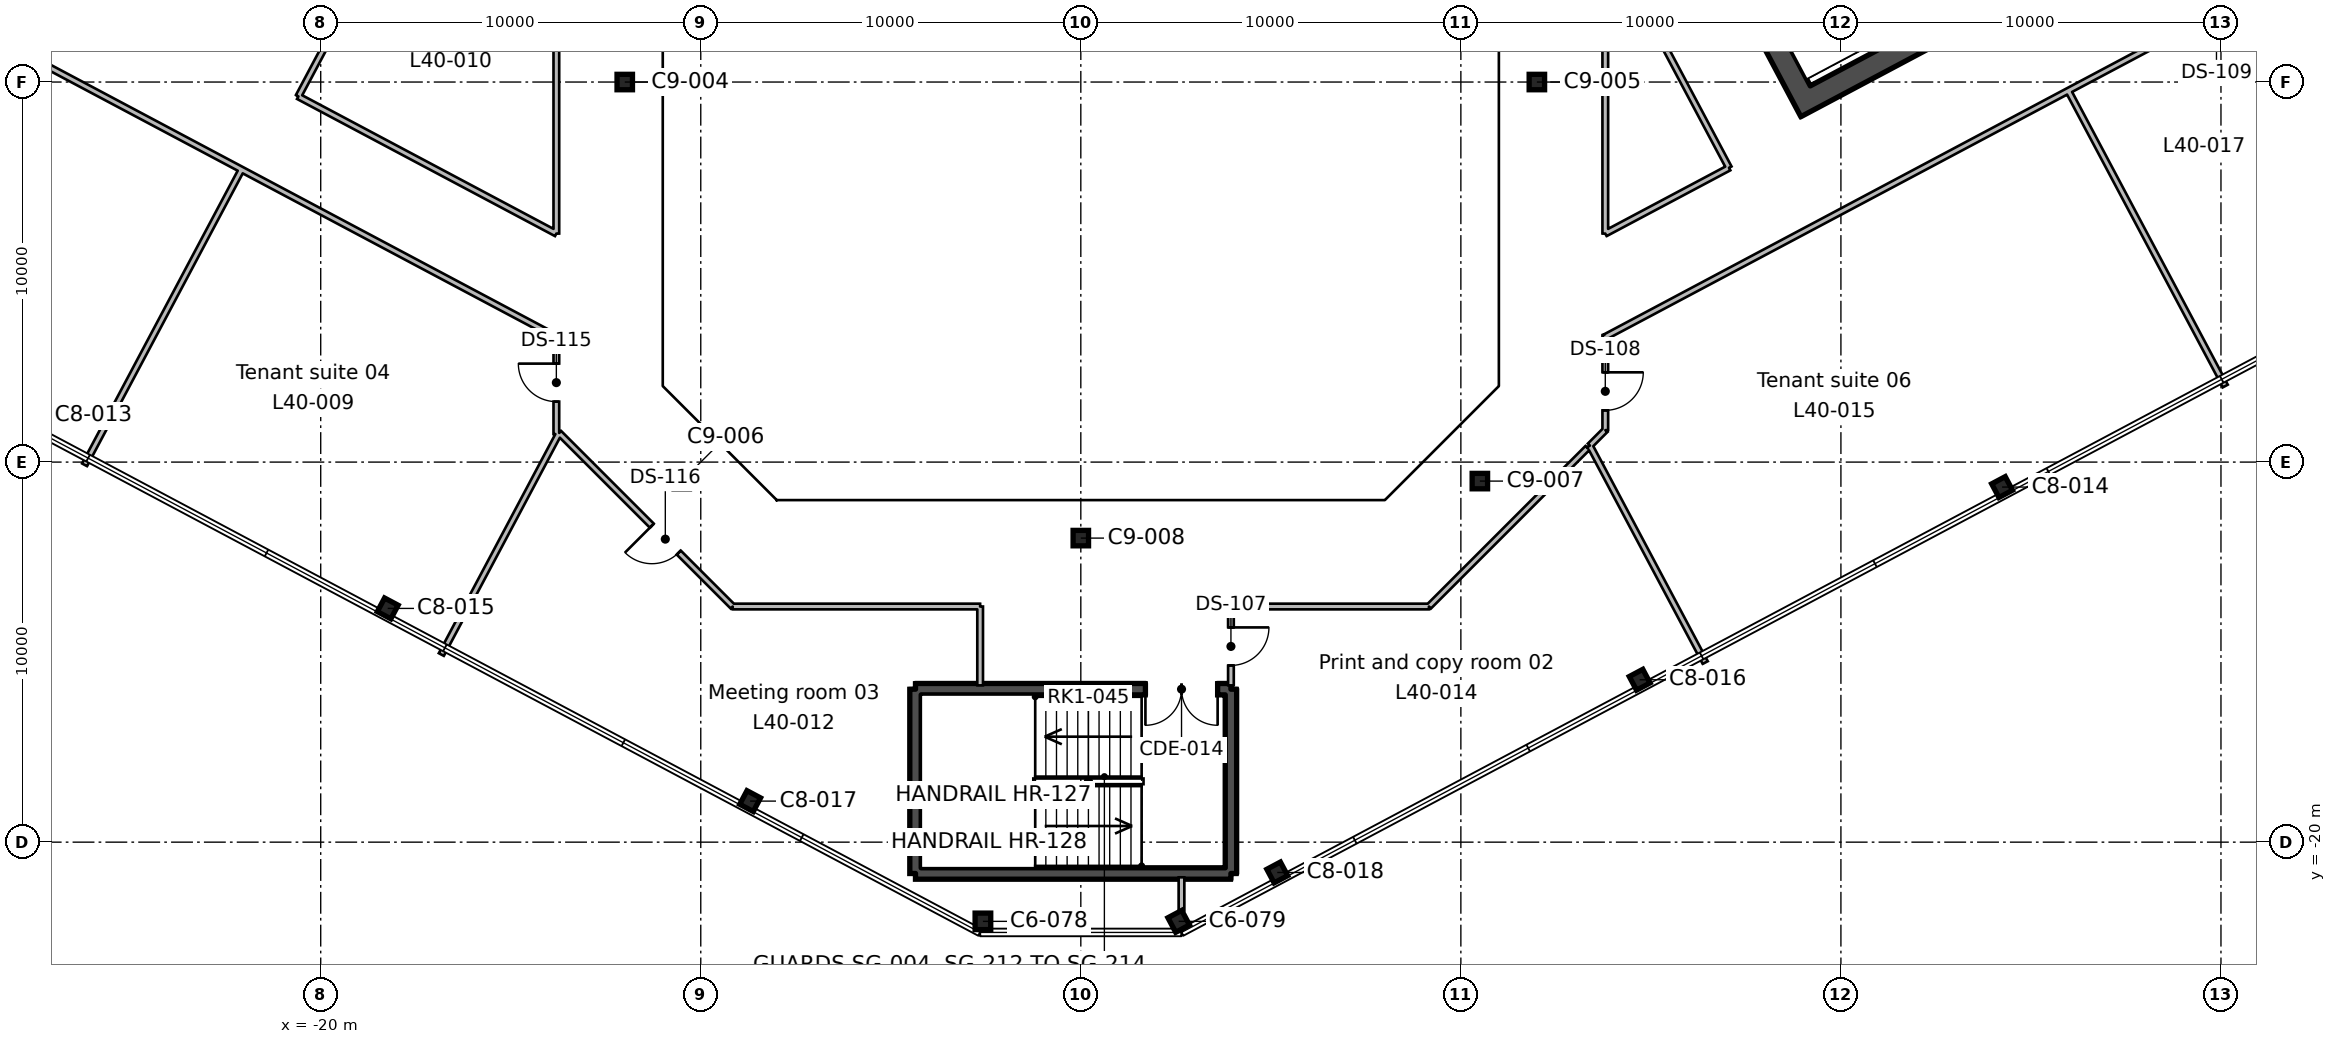
"""IFC4 building model, lengths in metres.
Left out: names, types, materials, properties, quantities, classifications, styles, units other than length and angle.
Written with IfcOpenShell. Run it as: python <this file> out.ifc"""

import sys

from ifc_helpers import new_model, si_unit, direction, frame, frame_2d, origin, origin_2d, place, context, subcontext, project, spatial, rectangle, hollow_rectangle, i_section, extrude, element, fill, save


model = new_model("IFC4")
c1 = context("Model", 3, precision=1e-05, world=origin(), true_north=direction((0.0, 1.0)))
c2 = subcontext(c1, "Body", "Model", "MODEL_VIEW")
j1 = project(units=[si_unit("LENGTHUNIT", "METRE"), si_unit("PLANEANGLEUNIT", "RADIAN")], contexts=[c1])
p1 = place(None, origin())
s1 = spatial("IfcSite", under=j1, at=p1, CompositionType="ELEMENT")
p2 = place(p1, origin())
s2 = spatial("IfcBuilding", under=s1, at=p2, CompositionType="ELEMENT")
p3 = place(p2, frame((0.0, 0.0, 189.6)))
s3 = spatial("IfcBuildingStorey", under=s2, at=p3, CompositionType="ELEMENT", Elevation=189.6)
for number, where, z_axis, x_axis in (
    (1, (-2.576, -22.084, 0.0), (0.0, 0.0, 1.0), (1.0, 0.0, 0.0)),
    (2, (2.576, -22.084, 0.0), (0.0, 0.0, 1.0), (0.883, 0.469, 0.0)),
):
    element("IfcColumn", number, at=place(p3, frame(where, z_axis=z_axis, x_axis=x_axis)), inside=s3, PredefinedType="COLUMN", context=c2, shape_type="SweptSolid", body=[
        extrude(i_section(OverallWidth=0.412, OverallDepth=0.434, WebThickness=0.036, FlangeThickness=0.057, FilletRadius=0.015, at=origin_2d()), origin(), (0.0, 0.0, 1.0), 3.9),
    ])
for number, where, z_axis, x_axis in (
    (3, (5.169, -20.798, 0.0), (0.0, 0.0, 1.0), (0.883, 0.469, 0.0)),
    (4, (-8.701, -18.92, 0.0), (0.0, 0.0, 1.0), (0.883, -0.469, 0.0)),
    (5, (14.705, -15.727, 0.0), (0.0, 0.0, 1.0), (0.883, 0.469, 0.0)),
    (6, (-18.237, -13.85, 0.0), (0.0, 0.0, 1.0), (0.883, -0.469, 0.0)),
):
    element("IfcColumn", number, at=place(p3, frame(where, z_axis=z_axis, x_axis=x_axis)), inside=s3, PredefinedType="COLUMN", context=c2, shape_type="SweptSolid", body=[
        extrude(i_section(OverallWidth=0.404, OverallDepth=0.406, WebThickness=0.027, FlangeThickness=0.044, FilletRadius=0.015, at=origin_2d()), origin(), (0.0, 0.0, 1.0), 3.9),
    ])
p4 = place(p3, frame((0.0, -12.0, 0.0), z_axis=(0.0, 0.0, 1.0), x_axis=(1.0, 0.0, 0.0)))
e7 = element("IfcColumn", 7, at=p4, inside=s3, PredefinedType="COLUMN", context=c2, shape_type="SweptSolid", body=[
    extrude(hollow_rectangle(XDim=0.406, YDim=0.406, WallThickness=0.015, InnerFilletRadius=0.007, OuterFilletRadius=0.022, at=origin_2d()), origin(), (0.0, 0.0, 1.0), 3.9),
])
p5 = place(p3, frame((24.241, -10.657, 0.0), z_axis=(0.0, 0.0, 1.0), x_axis=(0.882947592859, 0.469471562786, 0.0)))
e8 = element("IfcColumn", 8, at=p5, inside=s3, PredefinedType="COLUMN", context=c2, shape_type="SweptSolid", body=[
    extrude(i_section(OverallWidth=0.404, OverallDepth=0.406, WebThickness=0.027, FlangeThickness=0.044, FilletRadius=0.015, at=origin_2d()), origin(), (0.0, 0.0, 1.0), 3.9),
])
for number, where, z_axis, x_axis in (
    (9, (-10.5, -10.5, 0.0), (0.0, 0.0, 1.0), (1.0, 0.0, 0.0)),
    (10, (10.5, -10.5, 0.0), (0.0, 0.0, 1.0), (1.0, 0.0, 0.0)),
    (11, (-12.0, 0.0, 0.0), (0.0, 0.0, 1.0), (1.0, 0.0, 0.0)),
    (12, (12.0, 0.0, 0.0), (0.0, 0.0, 1.0), (1.0, 0.0, 0.0)),
):
    element("IfcColumn", number, at=place(p3, frame(where, z_axis=z_axis, x_axis=x_axis)), inside=s3, PredefinedType="COLUMN", context=c2, shape_type="SweptSolid", body=[
        extrude(hollow_rectangle(XDim=0.406, YDim=0.406, WallThickness=0.015, InnerFilletRadius=0.007, OuterFilletRadius=0.022, at=origin_2d()), origin(), (0.0, 0.0, 1.0), 3.9),
    ])
p6 = place(p3, frame((19.211, -0.771, 0.0), z_axis=(0.0, 0.0, 1.0), x_axis=(-0.469463742137, 0.882951751127, 0.0)))
e13 = element("IfcWall", 13, at=p6, inside=s3, PredefinedType="SHEAR", context=c2, shape_type="SweptSolid", body=[
    extrude(rectangle(XDim=19.4, YDim=0.6, at=frame_2d((9.7, 0.0))), origin(), (0.0, 0.0, 1.0), 3.9),
])
p7 = place(p6, frame((6.7, 0.0, 0.0)))
e14 = element("IfcOpeningElement", 14, at=p7, cuts=e13, PredefinedType="OPENING", context=c2, shape_type="SweptSolid", body=[
    extrude(rectangle(XDim=2.4, YDim=2.4, at=frame_2d((1.2, 1.2))), frame((0.0, 0.31, 0.0), z_axis=(0.0, -1.0, 0.0), x_axis=(1.0, 0.0, 0.0)), (0.0, 0.0, 1.0), 0.62),
])
p8 = place(p3, frame((19.335, -0.366, 0.0), z_axis=(0.0, 0.0, 1.0), x_axis=(0.88294509198, 0.469476266226, 0.0)))
e15 = element("IfcWall", 15, at=p8, inside=s3, PredefinedType="SHEAR", context=c2, shape_type="SweptSolid", body=[
    extrude(rectangle(XDim=20.2, YDim=0.6, at=frame_2d((10.1, 0.0))), origin(), (0.0, 0.0, 1.0), 3.9),
])
p9 = place(p3, frame((3.95, -15.975, 0.0), z_axis=(0.0, 0.0, 1.0), x_axis=(0.0, -1.0, 0.0)))
e16 = element("IfcWall", 16, at=p9, inside=s3, PredefinedType="SHEAR", context=c2, shape_type="SweptSolid", body=[
    extrude(rectangle(XDim=4.85, YDim=0.3, at=frame_2d((2.425, 0.0))), origin(), (0.0, 0.0, 1.0), 3.9),
])
p10 = place(p3, frame((3.95, -20.825, 0.0), z_axis=(0.0, 0.0, 1.0), x_axis=(-1.0, 0.0, 0.0)))
e17 = element("IfcWall", 17, at=p10, inside=s3, PredefinedType="SHEAR", context=c2, shape_type="SweptSolid", body=[
    extrude(rectangle(XDim=8.3, YDim=0.3, at=frame_2d((4.15, 0.0))), origin(), (0.0, 0.0, 1.0), 3.9),
])
p11 = place(p3, frame((-4.35, -20.825, 0.0), z_axis=(0.0, 0.0, 1.0), x_axis=(0.0, 1.0, 0.0)))
e18 = element("IfcWall", 18, at=p11, inside=s3, PredefinedType="SHEAR", context=c2, shape_type="SweptSolid", body=[
    extrude(rectangle(XDim=4.85, YDim=0.3, at=frame_2d((2.425, 0.0))), origin(), (0.0, 0.0, 1.0), 3.9),
])
p12 = place(p3, frame((-4.35, -15.975, 0.0), z_axis=(0.0, 0.0, 1.0), x_axis=(1.0, 0.0, 0.0)))
e19 = element("IfcWall", 19, at=p12, inside=s3, PredefinedType="SHEAR", context=c2, shape_type="SweptSolid", body=[
    extrude(rectangle(XDim=8.3, YDim=0.3, at=frame_2d((4.15, 0.0))), origin(), (0.0, 0.0, 1.0), 3.9),
])
p13 = place(p12, frame((6.05, 0.0, 0.0)))
e20 = element("IfcOpeningElement", 20, at=p13, cuts=e19, PredefinedType="OPENING", context=c2, shape_type="SweptSolid", body=[
    extrude(rectangle(XDim=1.9, YDim=2.1, at=frame_2d((0.95, 1.05))), frame((0.0, 0.16, 0.0), z_axis=(0.0, -1.0, 0.0), x_axis=(1.0, 0.0, 0.0)), (0.0, 0.0, 1.0), 0.32),
])
p14 = place(p3, frame((-22.083, -2.302, 0.0), z_axis=(0.0, 0.0, 1.0), x_axis=(-0.469445946219, -0.882961212952, 0.0)))
e21 = element("IfcWall", 21, at=p14, inside=s3, PredefinedType="PARTITIONING", context=c2, shape_type="SweptSolid", body=[
    extrude(rectangle(XDim=8.8, YDim=0.15, at=frame_2d((4.4, 0.0))), origin(), (0.0, 0.0, 1.0), 3.54),
])
p15 = place(p3, frame((-13.8, -9.263, 0.0), z_axis=(0.0, 0.0, 1.0), x_axis=(0.0, 1.0, 0.0)))
e22 = element("IfcWall", 22, at=p15, inside=s3, PredefinedType="PARTITIONING", context=c2, shape_type="SweptSolid", body=[
    extrude(rectangle(XDim=2.557, YDim=0.15, at=frame_2d((1.278, 0.0))), origin(), (0.0, 0.0, 1.0), 3.54),
])
p16 = place(p15, frame((0.854, 0.0, 0.0)))
e23 = element("IfcOpeningElement", 23, at=p16, cuts=e22, PredefinedType="OPENING", context=c2, shape_type="SweptSolid", body=[
    extrude(rectangle(XDim=1.0, YDim=2.1, at=frame_2d((0.5, 1.05))), frame((0.0, 0.085, 0.0), z_axis=(0.0, -1.0, 0.0), x_axis=(1.0, 0.0, 0.0)), (0.0, 0.0, 1.0), 0.17),
])
p17 = place(p3, frame((-13.8, -6.706, 0.0), z_axis=(0.0, 0.0, 1.0), x_axis=(-0.882947286887, 0.469472138235, 0.0)))
e24 = element("IfcWall", 24, at=p17, inside=s3, PredefinedType="PARTITIONING", context=c2, shape_type="SweptSolid", body=[
    extrude(rectangle(XDim=36.571, YDim=0.15, at=frame_2d((18.285, 0.0))), origin(), (0.0, 0.0, 1.0), 3.54),
])
p18 = place(p17, frame((34.15, 0.0, 0.0)))
e25 = element("IfcOpeningElement", 25, at=p18, cuts=e24, PredefinedType="OPENING", context=c2, shape_type="SweptSolid", body=[
    extrude(rectangle(XDim=1.0, YDim=2.1, at=frame_2d((0.5, 1.05))), frame((0.0, 0.085, 0.0), z_axis=(0.0, -1.0, 0.0), x_axis=(1.0, 0.0, 0.0)), (0.0, 0.0, 1.0), 0.17),
])
p19 = place(p17, frame((17.35, 0.0, 0.0)))
e26 = element("IfcOpeningElement", 26, at=p19, cuts=e24, PredefinedType="OPENING", context=c2, shape_type="SweptSolid", body=[
    extrude(rectangle(XDim=1.8, YDim=2.1, at=frame_2d((0.9, 1.05))), frame((0.0, 0.085, 0.0), z_axis=(0.0, -1.0, 0.0), x_axis=(1.0, 0.0, 0.0)), (0.0, 0.0, 1.0), 0.17),
])
p20 = place(p3, frame((-13.726, -9.234, 0.0), z_axis=(0.0, 0.0, 1.0), x_axis=(-0.469465185833, -0.882950983515, 0.0)))
e27 = element("IfcWall", 27, at=p20, inside=s3, PredefinedType="PARTITIONING", context=c2, shape_type="SweptSolid", body=[
    extrude(rectangle(XDim=6.603, YDim=0.15, at=frame_2d((3.302, 0.0))), origin(), (0.0, 0.0, 1.0), 3.54),
])
p21 = place(p3, frame((-13.726, -9.234, 0.0), z_axis=(0.0, 0.0, 1.0), x_axis=(0.707106781187, -0.707106781187, 0.0)))
e28 = element("IfcWall", 28, at=p21, inside=s3, PredefinedType="PARTITIONING", context=c2, shape_type="SweptSolid", body=[
    extrude(rectangle(XDim=6.458, YDim=0.15, at=frame_2d((3.229, 0.0))), origin(), (0.0, 0.0, 1.0), 3.54),
])
p22 = place(p21, frame((3.45, 0.0, 0.0)))
e29 = element("IfcOpeningElement", 29, at=p22, cuts=e28, PredefinedType="OPENING", context=c2, shape_type="SweptSolid", body=[
    extrude(rectangle(XDim=1.0, YDim=2.1, at=frame_2d((0.5, 1.05))), frame((0.0, 0.085, 0.0), z_axis=(0.0, -1.0, 0.0), x_axis=(1.0, 0.0, 0.0)), (0.0, 0.0, 1.0), 0.17),
])
p23 = place(p3, frame((-2.649, -15.875, 0.0), z_axis=(0.0, 0.0, 1.0), x_axis=(0.0, 1.0, 0.0)))
e30 = element("IfcWall", 30, at=p23, inside=s3, PredefinedType="PARTITIONING", context=c2, shape_type="SweptSolid", body=[
    extrude(rectangle(XDim=2.075, YDim=0.15, at=frame_2d((1.038, 0.0))), origin(), (0.0, 0.0, 1.0), 3.54),
])
p24 = place(p3, frame((-2.649, -13.8, 0.0), z_axis=(0.0, 0.0, 1.0), x_axis=(-1.0, 0.0, 0.0)))
e31 = element("IfcWall", 31, at=p24, inside=s3, PredefinedType="PARTITIONING", context=c2, shape_type="SweptSolid", body=[
    extrude(rectangle(XDim=6.511, YDim=0.15, at=frame_2d((3.255, 0.0))), origin(), (0.0, 0.0, 1.0), 3.54),
])
p25 = place(p3, frame((2.649, -21.799, 0.0), z_axis=(0.0, 0.0, 1.0), x_axis=(0.0, 1.0, 0.0)))
e32 = element("IfcWall", 32, at=p25, inside=s3, PredefinedType="PARTITIONING", context=c2, shape_type="SweptSolid", body=[
    extrude(rectangle(XDim=0.874, YDim=0.15, at=frame_2d((0.437, 0.0))), origin(), (0.0, 0.0, 1.0), 3.54),
])
p26 = place(p3, frame((3.95, -13.8, 0.0), z_axis=(0.0, 0.0, 1.0), x_axis=(0.0, -1.0, 0.0)))
e33 = element("IfcWall", 33, at=p26, inside=s3, PredefinedType="PARTITIONING", context=c2, shape_type="SweptSolid", body=[
    extrude(rectangle(XDim=2.075, YDim=0.15, at=frame_2d((1.038, 0.0))), origin(), (0.0, 0.0, 1.0), 3.54),
])
p27 = place(p26, frame((0.55, 0.0, 0.0)))
e34 = element("IfcOpeningElement", 34, at=p27, cuts=e33, PredefinedType="OPENING", context=c2, shape_type="SweptSolid", body=[
    extrude(rectangle(XDim=1.0, YDim=2.1, at=frame_2d((0.5, 1.05))), frame((0.0, 0.085, 0.0), z_axis=(0.0, -1.0, 0.0), x_axis=(1.0, 0.0, 0.0)), (0.0, 0.0, 1.0), 0.17),
])
p28 = place(p3, frame((13.331, -9.629, 0.0), z_axis=(0.0, 0.0, 1.0), x_axis=(-0.707106781187, -0.707106781187, 0.0)))
e35 = element("IfcWall", 35, at=p28, inside=s3, PredefinedType="PARTITIONING", context=c2, shape_type="SweptSolid", body=[
    extrude(rectangle(XDim=5.899, YDim=0.15, at=frame_2d((2.949, 0.0))), origin(), (0.0, 0.0, 1.0), 3.54),
])
p29 = place(p3, frame((9.16, -13.8, 0.0), z_axis=(0.0, 0.0, 1.0), x_axis=(-1.0, 0.0, 0.0)))
e36 = element("IfcWall", 36, at=p29, inside=s3, PredefinedType="PARTITIONING", context=c2, shape_type="SweptSolid", body=[
    extrude(rectangle(XDim=5.135, YDim=0.15, at=frame_2d((2.567, 0.0))), origin(), (0.0, 0.0, 1.0), 3.54),
])
p30 = place(p3, frame((13.393, -9.567, 0.0), z_axis=(0.0, 0.0, 1.0), x_axis=(0.469578527863, -0.882890710207, 0.0)))
e37 = element("IfcWall", 37, at=p30, inside=s3, PredefinedType="PARTITIONING", context=c2, shape_type="SweptSolid", body=[
    extrude(rectangle(XDim=6.465, YDim=0.15, at=frame_2d((3.232, 0.0))), origin(), (0.0, 0.0, 1.0), 3.54),
])
p31 = place(p3, frame((13.8, -6.656, 0.0), z_axis=(0.0, 0.0, 1.0), x_axis=(0.0, -1.0, 0.0)))
e38 = element("IfcWall", 38, at=p31, inside=s3, PredefinedType="PARTITIONING", context=c2, shape_type="SweptSolid", body=[
    extrude(rectangle(XDim=2.504, YDim=0.15, at=frame_2d((1.252, 0.0))), origin(), (0.0, 0.0, 1.0), 3.54),
])
p32 = place(p31, frame((0.982, 0.0, 0.0)))
e39 = element("IfcOpeningElement", 39, at=p32, cuts=e38, PredefinedType="OPENING", context=c2, shape_type="SweptSolid", body=[
    extrude(rectangle(XDim=1.0, YDim=2.1, at=frame_2d((0.5, 1.05))), frame((0.0, 0.085, 0.0), z_axis=(0.0, -1.0, 0.0), x_axis=(1.0, 0.0, 0.0)), (0.0, 0.0, 1.0), 0.17),
])
p33 = place(p3, frame((13.395, -9.565, 0.0), z_axis=(0.0, 0.0, 1.0), x_axis=(0.706254846232, 0.707957690949, 0.0)))
e40 = element("IfcWall", 40, at=p33, inside=s3, PredefinedType="PARTITIONING", context=c2, shape_type="SweptSolid", body=[
    extrude(rectangle(XDim=0.573, YDim=0.15, at=frame_2d((0.287, 0.0))), origin(), (0.0, 0.0, 1.0), 3.54),
])
p34 = place(p3, frame((25.982, -0.229, 0.0), z_axis=(0.0, 0.0, 1.0), x_axis=(0.469445946219, -0.882961212952, 0.0)))
e41 = element("IfcWall", 41, at=p34, inside=s3, PredefinedType="PARTITIONING", context=c2, shape_type="SweptSolid", body=[
    extrude(rectangle(XDim=8.8, YDim=0.15, at=frame_2d((4.4, 0.0))), origin(), (0.0, 0.0, 1.0), 3.54),
])
p35 = place(p3, frame((48.38, 11.679, 0.0), z_axis=(0.0, 0.0, 1.0), x_axis=(-0.882962559816, -0.469443412951, 0.0)))
e42 = element("IfcWall", 42, at=p35, inside=s3, PredefinedType="PARTITIONING", context=c2, shape_type="SweptSolid", body=[
    extrude(rectangle(XDim=39.163, YDim=0.15, at=frame_2d((19.582, 0.0))), origin(), (0.0, 0.0, 1.0), 3.54),
])
p36 = place(p35, frame((20.45, 0.0, 0.0)))
e43 = element("IfcOpeningElement", 43, at=p36, cuts=e42, PredefinedType="OPENING", context=c2, shape_type="SweptSolid", body=[
    extrude(rectangle(XDim=1.0, YDim=2.1, at=frame_2d((0.5, 1.05))), frame((0.0, 0.085, 0.0), z_axis=(0.0, -1.0, 0.0), x_axis=(1.0, 0.0, 0.0)), (0.0, 0.0, 1.0), 0.17),
])
p37 = place(p35, frame((18.75, 0.0, 0.0)))
e44 = element("IfcOpeningElement", 44, at=p37, cuts=e42, PredefinedType="OPENING", context=c2, shape_type="SweptSolid", body=[
    extrude(rectangle(XDim=1.0, YDim=2.1, at=frame_2d((0.5, 1.05))), frame((0.0, 0.085, 0.0), z_axis=(0.0, -1.0, 0.0), x_axis=(1.0, 0.0, 0.0)), (0.0, 0.0, 1.0), 0.17),
])
p38 = place(p3, frame((30.544, 2.197, 0.0), z_axis=(0.0, 0.0, 1.0), x_axis=(0.469518415739, -0.882922679107, 0.0)))
e45 = element("IfcWall", 45, at=p38, inside=s3, PredefinedType="PARTITIONING", context=c2, shape_type="SweptSolid", body=[
    extrude(rectangle(XDim=4.882, YDim=0.15, at=frame_2d((2.441, 0.0))), origin(), (0.0, 0.0, 1.0), 3.54),
])
p39 = place(p3, frame((-20.588, -0.379, 0.0), z_axis=(0.0, 0.0, 1.0), x_axis=(0.469489882812, 0.882937851685, 0.0)))
e46 = element("IfcWall", 46, at=p39, inside=s3, PredefinedType="PARTITIONING", context=c2, shape_type="SweptSolid", body=[
    extrude(rectangle(XDim=20.0, YDim=0.15, at=frame_2d((10.0, 0.0))), origin(), (0.0, 0.0, 1.0), 3.54),
])
p40 = place(p39, frame((9.55, 0.0, 0.0)))
e47 = element("IfcOpeningElement", 47, at=p40, cuts=e46, PredefinedType="OPENING", context=c2, shape_type="SweptSolid", body=[
    extrude(rectangle(XDim=1.0, YDim=2.1, at=frame_2d((0.5, 1.05))), frame((0.0, 0.085, 0.0), z_axis=(0.0, -1.0, 0.0), x_axis=(1.0, 0.0, 0.0)), (0.0, 0.0, 1.0), 0.17),
])
p41 = place(p3, frame((-13.8, 9.16, 0.0), z_axis=(0.0, 0.0, 1.0), x_axis=(0.0, -1.0, 0.0)))
e48 = element("IfcWall", 48, at=p41, inside=s3, PredefinedType="PARTITIONING", context=c2, shape_type="SweptSolid", body=[
    extrude(rectangle(XDim=13.148, YDim=0.15, at=frame_2d((6.574, 0.0))), origin(), (0.0, 0.0, 1.0), 3.54),
])
p42 = place(p3, frame((-13.8, -3.988, 0.0), z_axis=(0.0, 0.0, 1.0), x_axis=(-0.882949137368, 0.469468657976, 0.0)))
e49 = element("IfcWall", 49, at=p42, inside=s3, PredefinedType="PARTITIONING", context=c2, shape_type="SweptSolid", body=[
    extrude(rectangle(XDim=7.688, YDim=0.15, at=frame_2d((3.844, 0.0))), origin(), (0.0, 0.0, 1.0), 3.54),
])
p43 = place(p3, frame((17.056, -2.257, 0.0), z_axis=(0.0, 0.0, 1.0), x_axis=(-0.469433160251, 0.882968010778, 0.0)))
e50 = element("IfcWall", 50, at=p43, inside=s3, PredefinedType="PARTITIONING", context=c2, shape_type="SweptSolid", body=[
    extrude(rectangle(XDim=6.936, YDim=0.15, at=frame_2d((3.468, 0.0))), origin(), (0.0, 0.0, 1.0), 3.54),
])
p44 = place(p3, frame((13.8, 3.867, 0.0), z_axis=(0.0, 0.0, 1.0), x_axis=(0.0, -1.0, 0.0)))
e51 = element("IfcWall", 51, at=p44, inside=s3, PredefinedType="PARTITIONING", context=c2, shape_type="SweptSolid", body=[
    extrude(rectangle(XDim=7.855, YDim=0.15, at=frame_2d((3.927, 0.0))), origin(), (0.0, 0.0, 1.0), 3.54),
])
p45 = place(p3, frame((13.8, -3.988, 0.0), z_axis=(0.0, 0.0, 1.0), x_axis=(0.882971660552, 0.469426295239, 0.0)))
e52 = element("IfcWall", 52, at=p45, inside=s3, PredefinedType="PARTITIONING", context=c2, shape_type="SweptSolid", body=[
    extrude(rectangle(XDim=3.688, YDim=0.15, at=frame_2d((1.844, 0.0))), origin(), (0.0, 0.0, 1.0), 3.54),
])
p46 = place(p13, frame((1.9, 0.0, 0.0), z_axis=(0.0, 0.0, 1.0), x_axis=(-1.0, 0.0, 0.0)))
e53 = element("IfcDoor", 53, at=p46, inside=s3, OperationType="DOUBLE_DOOR_SINGLE_SWING", PredefinedType="DOOR", context=c2, shape_type="SweptSolid", body=[
    extrude(rectangle(XDim=1.9, YDim=2.1, at=frame_2d((0.95, 1.05))), frame((0.0, 0.025, 0.0), z_axis=(0.0, -1.0, 0.0), x_axis=(1.0, 0.0, 0.0)), (0.0, 0.0, 1.0), 0.05),
])
fill(e20, e53)
p47 = place(p27, origin())
e54 = element("IfcDoor", 54, at=p47, inside=s3, OperationType="SINGLE_SWING_LEFT", PredefinedType="DOOR", context=c2, shape_type="SweptSolid", body=[
    extrude(rectangle(XDim=1.0, YDim=2.1, at=frame_2d((0.5, 1.05))), frame((0.0, 0.025, 0.0), z_axis=(0.0, -1.0, 0.0), x_axis=(1.0, 0.0, 0.0)), (0.0, 0.0, 1.0), 0.05),
])
fill(e34, e54)
p48 = place(p32, origin())
e55 = element("IfcDoor", 55, at=p48, inside=s3, OperationType="SINGLE_SWING_LEFT", PredefinedType="DOOR", context=c2, shape_type="SweptSolid", body=[
    extrude(rectangle(XDim=1.0, YDim=2.1, at=frame_2d((0.5, 1.05))), frame((0.0, 0.025, 0.0), z_axis=(0.0, -1.0, 0.0), x_axis=(1.0, 0.0, 0.0)), (0.0, 0.0, 1.0), 0.05),
])
fill(e39, e55)
p49 = place(p16, origin())
e56 = element("IfcDoor", 56, at=p49, inside=s3, OperationType="SINGLE_SWING_RIGHT", PredefinedType="DOOR", context=c2, shape_type="SweptSolid", body=[
    extrude(rectangle(XDim=1.0, YDim=2.1, at=frame_2d((0.5, 1.05))), frame((0.0, 0.025, 0.0), z_axis=(0.0, -1.0, 0.0), x_axis=(1.0, 0.0, 0.0)), (0.0, 0.0, 1.0), 0.05),
])
fill(e23, e56)
p50 = place(p22, frame((1.0, 0.0, 0.0), z_axis=(0.0, 0.0, 1.0), x_axis=(-1.0, 0.0, 0.0)))
e57 = element("IfcDoor", 57, at=p50, inside=s3, OperationType="SINGLE_SWING_RIGHT", PredefinedType="DOOR", context=c2, shape_type="SweptSolid", body=[
    extrude(rectangle(XDim=1.0, YDim=2.1, at=frame_2d((0.5, 1.05))), frame((0.0, 0.025, 0.0), z_axis=(0.0, -1.0, 0.0), x_axis=(1.0, 0.0, 0.0)), (0.0, 0.0, 1.0), 0.05),
])
fill(e29, e57)
save(model, sys.argv[1])
